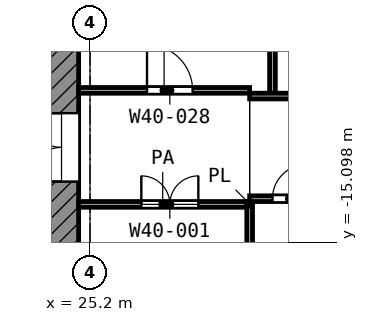
"""IFC4 building model, lengths in metres.
Left out: names, types, materials, properties, quantities, classifications, styles, units other than length and angle.
Written with IfcOpenShell. Run it as: python <this file> out.ifc"""

import sys

from ifc_helpers import new_model, si_unit, direction, frame, frame_2d, origin, place, context, subcontext, project, spatial, rectangle, extrude, element, fill, save


model = new_model("IFC4")
c1 = context("Model", 3, precision=1e-05, world=origin(), true_north=direction((0.0, 1.0)))
c2 = subcontext(c1, "Body", "Model", "MODEL_VIEW")
j1 = project(units=[si_unit("LENGTHUNIT", "METRE"), si_unit("PLANEANGLEUNIT", "RADIAN")], contexts=[c1])
p1 = place(None, origin())
s1 = spatial("IfcSite", under=j1, at=p1, CompositionType="ELEMENT")
p2 = place(p1, origin())
s2 = spatial("IfcBuilding", under=s1, at=p2, CompositionType="ELEMENT")
p3 = place(p2, frame((0.0, 0.0, 175.2)))
s3 = spatial("IfcBuildingStorey", under=s2, at=p3, CompositionType="ELEMENT", Elevation=175.2)
p4 = place(p3, frame((24.45, -24.0, 0.0), z_axis=(0.0, 0.0, 1.0), x_axis=(0.0, 1.0, 0.0)))
e1 = element("IfcWall", 1, at=p4, inside=s3, PredefinedType="SHEAR", context=c2, shape_type="SweptSolid", body=[
    extrude(rectangle(XDim=18.6, YDim=0.9, at=frame_2d((9.3, 0.0))), origin(), (0.0, 0.0, 1.0), 3.6),
])
p5 = place(p4, frame((10.5, 0.0, 0.0)))
e2 = element("IfcOpeningElement", 2, at=p5, cuts=e1, PredefinedType="OPENING", context=c2, shape_type="SweptSolid", body=[
    extrude(rectangle(XDim=1.8, YDim=2.1, at=frame_2d((0.9, 1.05))), frame((0.0, 0.46, 0.0), z_axis=(0.0, -1.0, 0.0), x_axis=(1.0, 0.0, 0.0)), (0.0, 0.0, 1.0), 0.92),
])
p6 = place(p3, frame((29.4, -14.147, 0.0), z_axis=(0.0, 0.0, 1.0), x_axis=(0.0, 1.0, 0.0)))
e3 = element("IfcWall", 3, at=p6, inside=s3, PredefinedType="PARTITIONING", context=c2, shape_type="SweptSolid", body=[
    extrude(rectangle(XDim=0.12, YDim=0.1, at=frame_2d((0.06, 0.0))), origin(), (0.0, 0.0, 1.0), 3.6),
])
p7 = place(p3, frame((24.9, -14.1, 0.0), z_axis=(0.0, 0.0, 1.0), x_axis=(1.0, 0.0, 0.0)))
e4 = element("IfcWall", 4, at=p7, inside=s3, PredefinedType="PARTITIONING", context=c2, shape_type="SweptSolid", body=[
    extrude(rectangle(XDim=4.425, YDim=0.15, at=frame_2d((2.212, 0.0))), origin(), (0.0, 0.0, 1.0), 3.6),
])
p8 = place(p7, frame((1.65, 0.0, 0.0)))
e5 = element("IfcOpeningElement", 5, at=p8, cuts=e4, PredefinedType="OPENING", context=c2, shape_type="SweptSolid", body=[
    extrude(rectangle(XDim=1.5, YDim=2.1, at=frame_2d((0.75, 1.05))), frame((0.0, 0.085, 0.0), z_axis=(0.0, -1.0, 0.0), x_axis=(1.0, 0.0, 0.0)), (0.0, 0.0, 1.0), 0.17),
])
p9 = place(p3, frame((29.4, -13.95, 0.0), z_axis=(0.0, 0.0, 1.0), x_axis=(1.0, 0.0, 0.0)))
e6 = element("IfcWall", 6, at=p9, inside=s3, PredefinedType="PARTITIONING", context=c2, shape_type="SweptSolid", body=[
    extrude(rectangle(XDim=37.72, YDim=0.15, at=frame_2d((18.86, 0.0))), origin(), (0.0, 0.0, 1.0), 3.6),
])
p10 = place(p9, frame((10.15, 0.0, 0.0)))
e7 = element("IfcOpeningElement", 7, at=p10, cuts=e6, PredefinedType="OPENING", context=c2, shape_type="SweptSolid", body=[
    extrude(rectangle(XDim=1.0, YDim=2.1, at=frame_2d((0.5, 1.05))), frame((0.0, 0.085, 0.0), z_axis=(0.0, -1.0, 0.0), x_axis=(1.0, 0.0, 0.0)), (0.0, 0.0, 1.0), 0.17),
])
p11 = place(p9, frame((12.8, 0.0, 0.0)))
e8 = element("IfcOpeningElement", 8, at=p11, cuts=e6, PredefinedType="OPENING", context=c2, shape_type="SweptSolid", body=[
    extrude(rectangle(XDim=1.1, YDim=2.1, at=frame_2d((0.55, 1.05))), frame((0.0, 0.085, 0.0), z_axis=(0.0, -1.0, 0.0), x_axis=(1.0, 0.0, 0.0)), (0.0, 0.0, 1.0), 0.17),
])
p12 = place(p9, frame((19.5, 0.0, 0.0)))
e9 = element("IfcOpeningElement", 9, at=p12, cuts=e6, PredefinedType="OPENING", context=c2, shape_type="SweptSolid", body=[
    extrude(rectangle(XDim=1.2, YDim=2.1, at=frame_2d((0.6, 1.05))), frame((0.0, 0.085, 0.0), z_axis=(0.0, -1.0, 0.0), x_axis=(1.0, 0.0, 0.0)), (0.0, 0.0, 1.0), 0.17),
])
p13 = place(p9, frame((21.7, 0.0, 0.0)))
e10 = element("IfcOpeningElement", 10, at=p13, cuts=e6, PredefinedType="OPENING", context=c2, shape_type="SweptSolid", body=[
    extrude(rectangle(XDim=1.2, YDim=2.1, at=frame_2d((0.6, 1.05))), frame((0.0, 0.085, 0.0), z_axis=(0.0, -1.0, 0.0), x_axis=(1.0, 0.0, 0.0)), (0.0, 0.0, 1.0), 0.17),
])
p14 = place(p9, frame((26.8, 0.0, 0.0)))
e11 = element("IfcOpeningElement", 11, at=p14, cuts=e6, PredefinedType="OPENING", context=c2, shape_type="SweptSolid", body=[
    extrude(rectangle(XDim=1.0, YDim=2.1, at=frame_2d((0.5, 1.05))), frame((0.0, 0.085, 0.0), z_axis=(0.0, -1.0, 0.0), x_axis=(1.0, 0.0, 0.0)), (0.0, 0.0, 1.0), 0.17),
])
p15 = place(p9, frame((31.3, 0.0, 0.0)))
e12 = element("IfcOpeningElement", 12, at=p15, cuts=e6, PredefinedType="OPENING", context=c2, shape_type="SweptSolid", body=[
    extrude(rectangle(XDim=1.0, YDim=2.1, at=frame_2d((0.5, 1.05))), frame((0.0, 0.085, 0.0), z_axis=(0.0, -1.0, 0.0), x_axis=(1.0, 0.0, 0.0)), (0.0, 0.0, 1.0), 0.17),
])
p16 = place(p9, frame((35.5, 0.0, 0.0)))
e13 = element("IfcOpeningElement", 13, at=p16, cuts=e6, PredefinedType="OPENING", context=c2, shape_type="SweptSolid", body=[
    extrude(rectangle(XDim=1.0, YDim=2.1, at=frame_2d((0.5, 1.05))), frame((0.0, 0.085, 0.0), z_axis=(0.0, -1.0, 0.0), x_axis=(1.0, 0.0, 0.0)), (0.0, 0.0, 1.0), 0.17),
])
p17 = place(p9, frame((0.6, 0.0, 0.0)))
e14 = element("IfcOpeningElement", 14, at=p17, cuts=e6, PredefinedType="OPENING", context=c2, shape_type="SweptSolid", body=[
    extrude(rectangle(XDim=0.9, YDim=2.1, at=frame_2d((0.45, 1.05))), frame((0.0, 0.085, 0.0), z_axis=(0.0, -1.0, 0.0), x_axis=(1.0, 0.0, 0.0)), (0.0, 0.0, 1.0), 0.17),
])
p18 = place(p9, frame((2.65, 0.0, 0.0)))
e15 = element("IfcOpeningElement", 15, at=p18, cuts=e6, PredefinedType="OPENING", context=c2, shape_type="SweptSolid", body=[
    extrude(rectangle(XDim=1.0, YDim=2.1, at=frame_2d((0.5, 1.05))), frame((0.0, 0.085, 0.0), z_axis=(0.0, -1.0, 0.0), x_axis=(1.0, 0.0, 0.0)), (0.0, 0.0, 1.0), 0.17),
])
p19 = place(p9, frame((5.85, 0.0, 0.0)))
e16 = element("IfcOpeningElement", 16, at=p19, cuts=e6, PredefinedType="OPENING", context=c2, shape_type="SweptSolid", body=[
    extrude(rectangle(XDim=1.2, YDim=2.1, at=frame_2d((0.6, 1.05))), frame((0.0, 0.085, 0.0), z_axis=(0.0, -1.0, 0.0), x_axis=(1.0, 0.0, 0.0)), (0.0, 0.0, 1.0), 0.17),
])
p20 = place(p3, frame((29.4, -11.25, 0.0), z_axis=(0.0, 0.0, 1.0), x_axis=(1.0, 0.0, 0.0)))
e17 = element("IfcWall", 17, at=p20, inside=s3, PredefinedType="PARTITIONING", context=c2, shape_type="SweptSolid", body=[
    extrude(rectangle(XDim=10.782, YDim=0.15, at=frame_2d((5.391, 0.0))), origin(), (0.0, 0.0, 1.0), 3.6),
])
p21 = place(p20, frame((1.9, 0.0, 0.0)))
e18 = element("IfcOpeningElement", 18, at=p21, cuts=e17, PredefinedType="OPENING", context=c2, shape_type="SweptSolid", body=[
    extrude(rectangle(XDim=1.0, YDim=2.1, at=frame_2d((0.5, 1.05))), frame((0.0, 0.085, 0.0), z_axis=(0.0, -1.0, 0.0), x_axis=(1.0, 0.0, 0.0)), (0.0, 0.0, 1.0), 0.17),
])
p22 = place(p20, frame((4.4, 0.0, 0.0)))
e19 = element("IfcOpeningElement", 19, at=p22, cuts=e17, PredefinedType="OPENING", context=c2, shape_type="SweptSolid", body=[
    extrude(rectangle(XDim=1.2, YDim=2.1, at=frame_2d((0.6, 1.05))), frame((0.0, 0.085, 0.0), z_axis=(0.0, -1.0, 0.0), x_axis=(1.0, 0.0, 0.0)), (0.0, 0.0, 1.0), 0.17),
])
p23 = place(p3, frame((24.9, -11.1, 0.0), z_axis=(0.0, 0.0, 1.0), x_axis=(1.0, 0.0, 0.0)))
e20 = element("IfcWall", 20, at=p23, inside=s3, PredefinedType="PARTITIONING", context=c2, shape_type="SweptSolid", body=[
    extrude(rectangle(XDim=4.498, YDim=0.15, at=frame_2d((2.249, 0.0))), origin(), (0.0, 0.0, 1.0), 3.6),
])
p24 = place(p23, frame((1.799, 0.0, 0.0)))
e21 = element("IfcOpeningElement", 21, at=p24, cuts=e20, PredefinedType="OPENING", context=c2, shape_type="SweptSolid", body=[
    extrude(rectangle(XDim=1.2, YDim=2.1, at=frame_2d((0.6, 1.05))), frame((0.0, 0.085, 0.0), z_axis=(0.0, -1.0, 0.0), x_axis=(1.0, 0.0, 0.0)), (0.0, 0.0, 1.0), 0.17),
])
p25 = place(p3, frame((29.4, -31.198, 0.0), z_axis=(0.0, 0.0, 1.0), x_axis=(0.0, 1.0, 0.0)))
e22 = element("IfcWall", 22, at=p25, inside=s3, PredefinedType="PARTITIONING", context=c2, shape_type="SweptSolid", body=[
    extrude(rectangle(XDim=17.098, YDim=0.15, at=frame_2d((8.549, 0.0))), origin(), (0.0, 0.0, 1.0), 3.6),
])
p26 = place(p3, frame((30.0, -11.175, 0.0), z_axis=(0.0, 0.0, 1.0), x_axis=(0.0, 1.0, 0.0)))
e23 = element("IfcWall", 23, at=p26, inside=s3, PredefinedType="PARTITIONING", context=c2, shape_type="SweptSolid", body=[
    extrude(rectangle(XDim=11.095, YDim=0.15, at=frame_2d((5.547, 0.0))), origin(), (0.0, 0.0, 1.0), 2.7),
])
p27 = place(p5, origin())
e24 = element("IfcDoor", 24, at=p27, inside=s3, OperationType="DOUBLE_DOOR_SINGLE_SWING", PredefinedType="DOOR", context=c2, shape_type="SweptSolid", body=[
    extrude(rectangle(XDim=1.8, YDim=2.1, at=frame_2d((0.9, 1.05))), frame((0.0, 0.025, 0.0), z_axis=(0.0, -1.0, 0.0), x_axis=(1.0, 0.0, 0.0)), (0.0, 0.0, 1.0), 0.05),
])
fill(e2, e24)
p28 = place(p8, origin())
e25 = element("IfcDoor", 25, at=p28, inside=s3, OperationType="DOUBLE_DOOR_SINGLE_SWING", PredefinedType="DOOR", context=c2, shape_type="SweptSolid", body=[
    extrude(rectangle(XDim=1.5, YDim=2.1, at=frame_2d((0.75, 1.05))), frame((0.0, 0.025, 0.0), z_axis=(0.0, -1.0, 0.0), x_axis=(1.0, 0.0, 0.0)), (0.0, 0.0, 1.0), 0.05),
])
fill(e5, e25)
p29 = place(p24, origin())
e26 = element("IfcDoor", 26, at=p29, inside=s3, OperationType="SINGLE_SWING_LEFT", PredefinedType="DOOR", context=c2, shape_type="SweptSolid", body=[
    extrude(rectangle(XDim=1.2, YDim=2.1, at=frame_2d((0.6, 1.05))), frame((0.0, 0.025, 0.0), z_axis=(0.0, -1.0, 0.0), x_axis=(1.0, 0.0, 0.0)), (0.0, 0.0, 1.0), 0.05),
])
fill(e21, e26)
p30 = place(p17, origin())
e27 = element("IfcDoor", 27, at=p30, inside=s3, OperationType="SINGLE_SWING_RIGHT", PredefinedType="DOOR", context=c2, shape_type="SweptSolid", body=[
    extrude(rectangle(XDim=0.9, YDim=2.1, at=frame_2d((0.45, 1.05))), frame((0.0, 0.025, 0.0), z_axis=(0.0, -1.0, 0.0), x_axis=(1.0, 0.0, 0.0)), (0.0, 0.0, 1.0), 0.05),
])
fill(e14, e27)
save(model, sys.argv[1])
